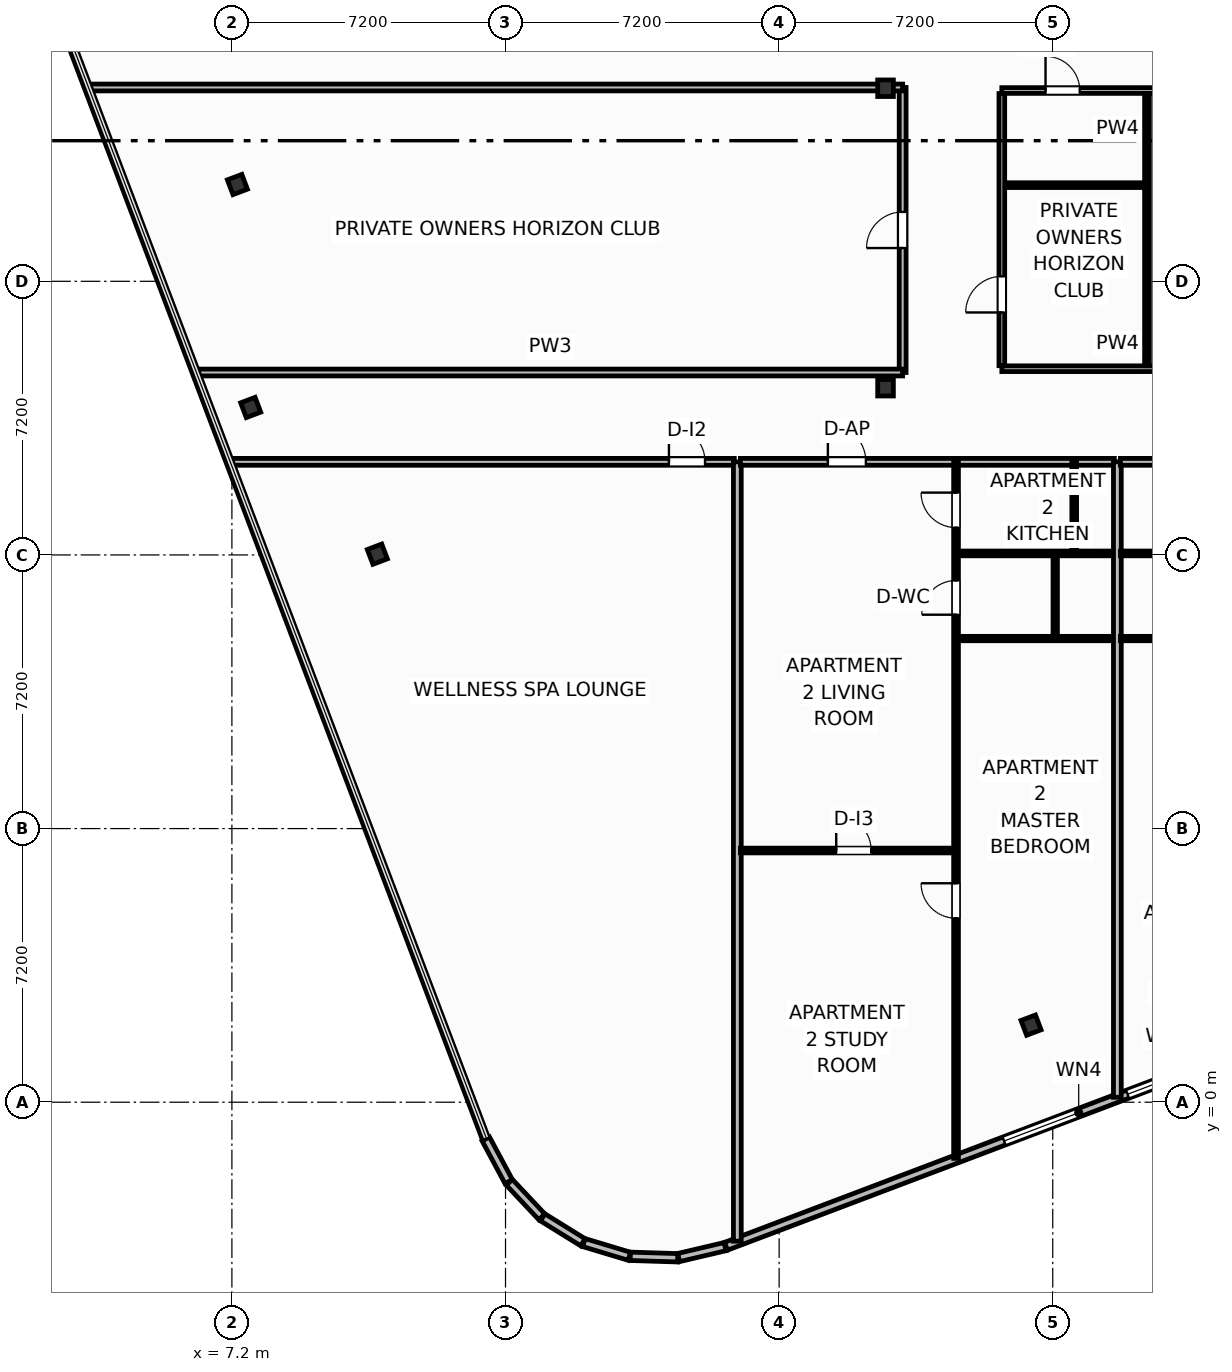
"""IFC4 building model, lengths in metres.
Left out: names, types, materials, properties, quantities, classifications, styles, units other than length and angle.
Written with IfcOpenShell. Run it as: python <this file> out.ifc"""

import sys

from ifc_helpers import new_model, si_unit, direction, frame, frame_2d, origin, origin_2d, place, context, subcontext, project, spatial, rectangle, i_section, extrude, element, fill, save


model = new_model("IFC4")
c1 = context("Model", 3, precision=1e-05, world=origin(), true_north=direction((0.0, 1.0)))
c2 = subcontext(c1, "Body", "Model", "MODEL_VIEW")
j1 = project(units=[si_unit("LENGTHUNIT", "METRE"), si_unit("PLANEANGLEUNIT", "RADIAN")], contexts=[c1])
p1 = place(None, origin())
s1 = spatial("IfcSite", under=j1, at=p1, CompositionType="ELEMENT")
p2 = place(p1, origin())
s2 = spatial("IfcBuilding", under=s1, at=p2, CompositionType="ELEMENT")
p3 = place(p2, frame((0.0, 0.0, 216.4)))
s3 = spatial("IfcBuildingStorey", under=s2, at=p3, CompositionType="ELEMENT", Elevation=216.4)
for number, where, z_axis, x_axis in (
    (1, (24.4, 18.8, 0.0), (0.0, 0.0, 1.0), (1.0, 0.0, 0.0)),
    (2, (24.4, 26.68, 0.0), (0.0, 0.0, 1.0), (1.0, 0.0, 0.0)),
):
    element("IfcColumn", number, at=place(p3, frame(where, z_axis=z_axis, x_axis=x_axis)), inside=s3, PredefinedType="COLUMN", context=c2, shape_type="SweptSolid", body=[
        extrude(i_section(OverallWidth=0.412, OverallDepth=0.435, WebThickness=0.036, FlangeThickness=0.057, FilletRadius=0.025, at=origin_2d()), origin(), (0.0, 0.0, 1.0), 3.7),
    ])
for number, where, z_axis, x_axis in (
    (3, (28.229, 2.028, 0.0), (0.0, 0.0, 1.0), (0.935, 0.354, 0.0)),
    (4, (7.345, 24.146, 0.0), (0.0, 0.0, 1.0), (0.935, 0.354, 0.0)),
    (5, (7.695, 18.281, 0.0), (0.0, 0.0, 1.0), (0.935, 0.354, 0.0)),
    (6, (11.027, 14.42, 0.0), (0.0, 0.0, 1.0), (0.935, 0.354, 0.0)),
):
    element("IfcColumn", number, at=place(p3, frame(where, z_axis=z_axis, x_axis=x_axis)), inside=s3, PredefinedType="COLUMN", context=c2, shape_type="SweptSolid", body=[
        extrude(i_section(OverallWidth=0.406, OverallDepth=0.416, WebThickness=0.03, FlangeThickness=0.048, FilletRadius=0.025, at=origin_2d()), origin(), (0.0, 0.0, 1.0), 3.7),
    ])
p4 = place(p3, frame((13.881, -0.966, 0.0), z_axis=(0.0, 0.0, 1.0), x_axis=(0.473242342135, -0.88093228208, 0.0)))
e7 = element("IfcWall", 7, at=p4, inside=s3, PredefinedType="SOLIDWALL", context=c2, shape_type="SweptSolid", body=[
    extrude(rectangle(XDim=1.274, YDim=0.22, at=frame_2d((0.637, 0.0))), origin(), (0.0, 0.0, 1.0), 2.73),
])
for number, where, z_axis, x_axis in (
    (8, (14.5, -2.106, 0.0), (0.0, 0.0, 1.0), (0.685, -0.729, 0.0)),
    (9, (15.377, -3.029, 0.0), (0.0, 0.0, 1.0), (0.85, -0.526, 0.0)),
    (10, (16.463, -3.694, 0.0), (0.0, 0.0, 1.0), (0.958, -0.288, 0.0)),
):
    element("IfcWall", number, at=place(p3, frame(where, z_axis=z_axis, x_axis=x_axis)), inside=s3, PredefinedType="SOLIDWALL", context=c2, shape_type="SweptSolid", body=[
        extrude(rectangle(XDim=1.249, YDim=0.22, at=frame_2d((0.624, 0.0))), origin(), (0.0, 0.0, 1.0), 2.73),
    ])
p5 = place(p3, frame((17.683, -4.055, 0.0), z_axis=(0.0, 0.0, 1.0), x_axis=(0.999522886512, -0.030886879732, 0.0)))
e11 = element("IfcWall", 11, at=p5, inside=s3, PredefinedType="SOLIDWALL", context=c2, shape_type="SweptSolid", body=[
    extrude(rectangle(XDim=1.249, YDim=0.22, at=frame_2d((0.625, 0.0))), origin(), (0.0, 0.0, 1.0), 2.73),
])
p6 = place(p3, frame((18.956, -4.087, 0.0), z_axis=(0.0, 0.0, 1.0), x_axis=(0.973463008152, 0.228844426981, 0.0)))
e12 = element("IfcWall", 12, at=p6, inside=s3, PredefinedType="SOLIDWALL", context=c2, shape_type="SweptSolid", body=[
    extrude(rectangle(XDim=1.257, YDim=0.22, at=frame_2d((0.628, 0.0))), origin(), (0.0, 0.0, 1.0), 2.73),
])
p7 = place(p3, frame((20.202, -3.791, 0.0), z_axis=(0.0, 0.0, 1.0), x_axis=(0.935225574232, 0.354052432984, 0.0)))
e13 = element("IfcWall", 13, at=p7, inside=s3, PredefinedType="SOLIDWALL", context=c2, shape_type="SweptSolid", body=[
    extrude(rectangle(XDim=17.747, YDim=0.22, at=frame_2d((8.874, 0.0))), origin(), (0.0, 0.0, 1.0), 2.73),
])
p8 = place(p7, frame((7.823, 0.0, 0.8)))
e14 = element("IfcOpeningElement", 14, at=p8, cuts=e13, PredefinedType="OPENING", context=c2, shape_type="SweptSolid", body=[
    extrude(rectangle(XDim=2.1, YDim=1.75, at=frame_2d((1.05, 0.875))), frame((0.0, 0.12, 0.0), z_axis=(0.0, -1.0, 0.0), x_axis=(1.0, 0.0, 0.0)), (0.0, 0.0, 1.0), 0.24),
])
p9 = place(p7, frame((11.298, 0.0, 0.8)))
e15 = element("IfcOpeningElement", 15, at=p9, cuts=e13, PredefinedType="OPENING", context=c2, shape_type="SweptSolid", body=[
    extrude(rectangle(XDim=1.15, YDim=1.4, at=frame_2d((0.575, 0.7))), frame((0.0, 0.12, 0.0), z_axis=(0.0, -1.0, 0.0), x_axis=(1.0, 0.0, 0.0)), (0.0, 0.0, 1.0), 0.24),
])
p10 = place(p3, frame((7.196, 16.85, 0.0), z_axis=(0.0, 0.0, 1.0), x_axis=(1.0, 0.0, 0.0)))
e16 = element("IfcWall", 16, at=p10, inside=s3, PredefinedType="PARTITIONING", context=c2, shape_type="SweptSolid", body=[
    extrude(rectangle(XDim=13.224, YDim=0.18, at=frame_2d((6.612, 0.0))), origin(), (0.0, 0.0, 1.0), 3.45),
])
p11 = place(p10, frame((11.504, 0.0, 0.0)))
e17 = element("IfcOpeningElement", 17, at=p11, cuts=e16, PredefinedType="OPENING", context=c2, shape_type="SweptSolid", body=[
    extrude(rectangle(XDim=0.95, YDim=2.05, at=frame_2d((0.475, 1.025))), frame((0.0, 0.1, 0.0), z_axis=(0.0, -1.0, 0.0), x_axis=(1.0, 0.0, 0.0)), (0.0, 0.0, 1.0), 0.2),
])
p12 = place(p3, frame((20.5, -3.657, 0.0), z_axis=(0.0, 0.0, 1.0), x_axis=(0.0, 1.0, 0.0)))
e18 = element("IfcWall", 18, at=p12, inside=s3, PredefinedType="PARTITIONING", context=c2, shape_type="SweptSolid", body=[
    extrude(rectangle(XDim=20.507, YDim=0.205, at=frame_2d((10.253, 0.0))), origin(), (0.0, 0.0, 1.0), 3.45),
])
p13 = place(p3, frame((20.58, 6.623, 0.0), z_axis=(0.0, 0.0, 1.0), x_axis=(1.0, 0.0, 0.0)))
e19 = element("IfcWall", 19, at=p13, inside=s3, PredefinedType="PARTITIONING", context=c2, shape_type="SweptSolid", body=[
    extrude(rectangle(XDim=5.605, YDim=0.125, at=frame_2d((2.803, 0.0))), origin(), (0.0, 0.0, 1.0), 3.45),
])
p14 = place(p13, frame((2.522, 0.0, 0.0)))
e20 = element("IfcOpeningElement", 20, at=p14, cuts=e19, PredefinedType="OPENING", context=c2, shape_type="SweptSolid", body=[
    extrude(rectangle(XDim=0.92, YDim=2.05, at=frame_2d((0.46, 1.025))), frame((0.0, 0.073, 0.0), z_axis=(0.0, -1.0, 0.0), x_axis=(1.0, 0.0, 0.0)), (0.0, 0.0, 1.0), 0.145),
])
p15 = place(p3, frame((20.58, 16.85, 0.0), z_axis=(0.0, 0.0, 1.0), x_axis=(1.0, 0.0, 0.0)))
e21 = element("IfcWall", 21, at=p15, inside=s3, PredefinedType="PARTITIONING", context=c2, shape_type="SweptSolid", body=[
    extrude(rectangle(XDim=9.84, YDim=0.18, at=frame_2d((4.92, 0.0))), origin(), (0.0, 0.0, 1.0), 3.45),
])
p16 = place(p15, frame((2.302, 0.0, 0.0)))
e22 = element("IfcOpeningElement", 22, at=p16, cuts=e21, PredefinedType="OPENING", context=c2, shape_type="SweptSolid", body=[
    extrude(rectangle(XDim=1.0, YDim=2.2, at=frame_2d((0.5, 1.1))), frame((0.0, 0.1, 0.0), z_axis=(0.0, -1.0, 0.0), x_axis=(1.0, 0.0, 0.0)), (0.0, 0.0, 1.0), 0.2),
])
p17 = place(p3, frame((26.255, -1.478, 0.0), z_axis=(0.0, 0.0, 1.0), x_axis=(0.0, 1.0, 0.0)))
e23 = element("IfcWall", 23, at=p17, inside=s3, PredefinedType="PARTITIONING", context=c2, shape_type="SweptSolid", body=[
    extrude(rectangle(XDim=18.328, YDim=0.125, at=frame_2d((9.164, 0.0))), origin(), (0.0, 0.0, 1.0), 2.739),
])
p18 = place(p17, frame((6.319, 0.0, 0.0)))
e24 = element("IfcOpeningElement", 24, at=p18, cuts=e23, PredefinedType="OPENING", context=c2, shape_type="SweptSolid", body=[
    extrude(rectangle(XDim=0.92, YDim=2.05, at=frame_2d((0.46, 1.025))), frame((0.0, 0.073, 0.0), z_axis=(0.0, -1.0, 0.0), x_axis=(1.0, 0.0, 0.0)), (0.0, 0.0, 1.0), 0.145),
])
p19 = place(p17, frame((14.305, 0.0, 0.0)))
e25 = element("IfcOpeningElement", 25, at=p19, cuts=e23, PredefinedType="OPENING", context=c2, shape_type="SweptSolid", body=[
    extrude(rectangle(XDim=0.9, YDim=2.05, at=frame_2d((0.45, 1.025))), frame((0.0, 0.073, 0.0), z_axis=(0.0, -1.0, 0.0), x_axis=(1.0, 0.0, 0.0)), (0.0, 0.0, 1.0), 0.145),
])
p20 = place(p17, frame((16.598, 0.0, 0.0)))
e26 = element("IfcOpeningElement", 26, at=p20, cuts=e23, PredefinedType="OPENING", context=c2, shape_type="SweptSolid", body=[
    extrude(rectangle(XDim=0.92, YDim=2.05, at=frame_2d((0.46, 1.025))), frame((0.0, 0.073, 0.0), z_axis=(0.0, -1.0, 0.0), x_axis=(1.0, 0.0, 0.0)), (0.0, 0.0, 1.0), 0.145),
])
p21 = place(p3, frame((26.325, 14.44, 0.0), z_axis=(0.0, 0.0, 1.0), x_axis=(1.0, 0.0, 0.0)))
e27 = element("IfcWall", 27, at=p21, inside=s3, PredefinedType="PARTITIONING", context=c2, shape_type="SweptSolid", body=[
    extrude(rectangle(XDim=4.095, YDim=0.125, at=frame_2d((2.047, 0.0))), origin(), (0.0, 0.0, 1.0), 3.45),
])
p22 = place(p3, frame((26.325, 12.2, 0.0), z_axis=(0.0, 0.0, 1.0), x_axis=(1.0, 0.0, 0.0)))
e28 = element("IfcWall", 28, at=p22, inside=s3, PredefinedType="PARTITIONING", context=c2, shape_type="SweptSolid", body=[
    extrude(rectangle(XDim=4.095, YDim=0.115, at=frame_2d((2.047, 0.0))), origin(), (0.0, 0.0, 1.0), 3.45),
])
p23 = place(p3, frame((29.365, 14.44, 0.0), z_axis=(0.0, 0.0, 1.0), x_axis=(0.0, 1.0, 0.0)))
e29 = element("IfcWall", 29, at=p23, inside=s3, PredefinedType="PARTITIONING", context=c2, shape_type="SweptSolid", body=[
    extrude(rectangle(XDim=2.41, YDim=0.125, at=frame_2d((1.205, 0.0))), origin(), (0.0, 0.0, 1.0), 3.45),
])
p24 = place(p3, frame((28.865, 12.2, 0.0), z_axis=(0.0, 0.0, 1.0), x_axis=(0.0, 1.0, 0.0)))
e30 = element("IfcWall", 30, at=p24, inside=s3, PredefinedType="PARTITIONING", context=c2, shape_type="SweptSolid", body=[
    extrude(rectangle(XDim=2.24, YDim=0.115, at=frame_2d((1.12, 0.0))), origin(), (0.0, 0.0, 1.0), 3.45),
])
p25 = place(p3, frame((30.5, 0.129, 0.0), z_axis=(0.0, 0.0, 1.0), x_axis=(0.0, 1.0, 0.0)))
e31 = element("IfcWall", 31, at=p25, inside=s3, PredefinedType="PARTITIONING", context=c2, shape_type="SweptSolid", body=[
    extrude(rectangle(XDim=16.721, YDim=0.205, at=frame_2d((8.36, 0.0))), origin(), (0.0, 0.0, 1.0), 3.45),
])
p26 = place(p3, frame((30.58, 16.85, 0.0), z_axis=(0.0, 0.0, 1.0), x_axis=(1.0, 0.0, 0.0)))
e32 = element("IfcWall", 32, at=p26, inside=s3, PredefinedType="PARTITIONING", context=c2, shape_type="SweptSolid", body=[
    extrude(rectangle(XDim=9.84, YDim=0.18, at=frame_2d((4.92, 0.0))), origin(), (0.0, 0.0, 1.0), 3.45),
])
p27 = place(p26, frame((6.537, 0.0, 0.0)))
e33 = element("IfcOpeningElement", 33, at=p27, cuts=e32, PredefinedType="OPENING", context=c2, shape_type="SweptSolid", body=[
    extrude(rectangle(XDim=1.0, YDim=2.2, at=frame_2d((0.5, 1.1))), frame((0.0, 0.1, 0.0), z_axis=(0.0, -1.0, 0.0), x_axis=(1.0, 0.0, 0.0)), (0.0, 0.0, 1.0), 0.2),
])
p28 = place(p3, frame((30.58, 14.44, 0.0), z_axis=(0.0, 0.0, 1.0), x_axis=(1.0, 0.0, 0.0)))
e34 = element("IfcWall", 34, at=p28, inside=s3, PredefinedType="PARTITIONING", context=c2, shape_type="SweptSolid", body=[
    extrude(rectangle(XDim=4.095, YDim=0.125, at=frame_2d((2.047, 0.0))), origin(), (0.0, 0.0, 1.0), 3.45),
])
p29 = place(p3, frame((30.58, 12.2, 0.0), z_axis=(0.0, 0.0, 1.0), x_axis=(1.0, 0.0, 0.0)))
e35 = element("IfcWall", 35, at=p29, inside=s3, PredefinedType="PARTITIONING", context=c2, shape_type="SweptSolid", body=[
    extrude(rectangle(XDim=4.095, YDim=0.115, at=frame_2d((2.047, 0.0))), origin(), (0.0, 0.0, 1.0), 3.45),
])
p30 = place(p3, frame((24.85, 19.2, 0.0), z_axis=(0.0, 0.0, 1.0), x_axis=(0.0, 1.0, 0.0)))
e36 = element("IfcWall", 36, at=p30, inside=s3, PredefinedType="PARTITIONING", context=c2, shape_type="SweptSolid", body=[
    extrude(rectangle(XDim=7.5, YDim=0.18, at=frame_2d((3.75, 0.0))), origin(), (0.0, 0.0, 1.0), 3.45),
])
p31 = place(p30, frame((3.275, 0.0, 0.0)))
e37 = element("IfcOpeningElement", 37, at=p31, cuts=e36, PredefinedType="OPENING", context=c2, shape_type="SweptSolid", body=[
    extrude(rectangle(XDim=0.95, YDim=2.05, at=frame_2d((0.475, 1.025))), frame((0.0, 0.1, 0.0), z_axis=(0.0, -1.0, 0.0), x_axis=(1.0, 0.0, 0.0)), (0.0, 0.0, 1.0), 0.2),
])
p32 = place(p3, frame((6.306, 19.2, 0.0), z_axis=(0.0, 0.0, 1.0), x_axis=(1.0, 0.0, 0.0)))
e38 = element("IfcWall", 38, at=p32, inside=s3, PredefinedType="PARTITIONING", context=c2, shape_type="SweptSolid", body=[
    extrude(rectangle(XDim=18.544, YDim=0.18, at=frame_2d((9.272, 0.0))), origin(), (0.0, 0.0, 1.0), 3.45),
])
p33 = place(p3, frame((3.467, 26.7, 0.0), z_axis=(0.0, 0.0, 1.0), x_axis=(1.0, 0.0, 0.0)))
e39 = element("IfcWall", 39, at=p33, inside=s3, PredefinedType="PARTITIONING", context=c2, shape_type="SweptSolid", body=[
    extrude(rectangle(XDim=21.383, YDim=0.18, at=frame_2d((10.691, 0.0))), origin(), (0.0, 0.0, 1.0), 2.662),
])
p34 = place(p3, frame((27.46, 19.3, 0.0), z_axis=(0.0, 0.0, 1.0), x_axis=(1.0, 0.0, 0.0)))
e40 = element("IfcWall", 40, at=p34, inside=s3, PredefinedType="PARTITIONING", context=c2, shape_type="SweptSolid", body=[
    extrude(rectangle(XDim=6.1, YDim=0.15, at=frame_2d((3.05, 0.0))), origin(), (0.0, 0.0, 1.0), 2.662),
])
p35 = place(p3, frame((27.46, 26.62, 0.0), z_axis=(0.0, 0.0, 1.0), x_axis=(1.0, 0.0, 0.0)))
e41 = element("IfcWall", 41, at=p35, inside=s3, PredefinedType="PARTITIONING", context=c2, shape_type="SweptSolid", body=[
    extrude(rectangle(XDim=6.1, YDim=0.15, at=frame_2d((3.05, 0.0))), origin(), (0.0, 0.0, 1.0), 2.662),
])
p36 = place(p35, frame((1.15, 0.0, 0.0)))
e42 = element("IfcOpeningElement", 42, at=p36, cuts=e41, PredefinedType="OPENING", context=c2, shape_type="SweptSolid", body=[
    extrude(rectangle(XDim=0.9, YDim=2.05, at=frame_2d((0.45, 1.025))), frame((0.0, 0.085, 0.0), z_axis=(0.0, -1.0, 0.0), x_axis=(1.0, 0.0, 0.0)), (0.0, 0.0, 1.0), 0.17),
])
p37 = place(p35, frame((4.45, 0.0, 0.0)))
e43 = element("IfcOpeningElement", 43, at=p37, cuts=e41, PredefinedType="OPENING", context=c2, shape_type="SweptSolid", body=[
    extrude(rectangle(XDim=0.92, YDim=2.05, at=frame_2d((0.46, 1.025))), frame((0.0, 0.085, 0.0), z_axis=(0.0, -1.0, 0.0), x_axis=(1.0, 0.0, 0.0)), (0.0, 0.0, 1.0), 0.17),
])
p38 = place(p3, frame((31.28, 19.38, 0.0), z_axis=(0.0, 0.0, 1.0), x_axis=(0.0, 1.0, 0.0)))
e44 = element("IfcWall", 44, at=p38, inside=s3, PredefinedType="PARTITIONING", context=c2, shape_type="SweptSolid", body=[
    extrude(rectangle(XDim=7.16, YDim=0.125, at=frame_2d((3.58, 0.0))), origin(), (0.0, 0.0, 1.0), 3.45),
])
p39 = place(p3, frame((27.52, 24.13, 0.0), z_axis=(0.0, 0.0, 1.0), x_axis=(1.0, 0.0, 0.0)))
e45 = element("IfcWall", 45, at=p39, inside=s3, PredefinedType="PARTITIONING", context=c2, shape_type="SweptSolid", body=[
    extrude(rectangle(XDim=3.7, YDim=0.125, at=frame_2d((1.85, 0.0))), origin(), (0.0, 0.0, 1.0), 3.45),
])
p40 = place(p3, frame((27.46, 19.38, 0.0), z_axis=(0.0, 0.0, 1.0), x_axis=(0.0, 1.0, 0.0)))
e46 = element("IfcWall", 46, at=p40, inside=s3, PredefinedType="PARTITIONING", context=c2, shape_type="SweptSolid", body=[
    extrude(rectangle(XDim=7.16, YDim=0.15, at=frame_2d((3.58, 0.0))), origin(), (0.0, 0.0, 1.0), 3.45),
])
p41 = place(p40, frame((1.4, 0.0, 0.0)))
e47 = element("IfcOpeningElement", 47, at=p41, cuts=e46, PredefinedType="OPENING", context=c2, shape_type="SweptSolid", body=[
    extrude(rectangle(XDim=0.95, YDim=2.05, at=frame_2d((0.475, 1.025))), frame((0.0, 0.085, 0.0), z_axis=(0.0, -1.0, 0.0), x_axis=(1.0, 0.0, 0.0)), (0.0, 0.0, 1.0), 0.17),
])
p42 = place(p8, origin())
e48 = element("IfcWindow", 48, at=p42, inside=s3, PartitioningType="SINGLE_PANEL", PredefinedType="WINDOW", context=c2, shape_type="SweptSolid", body=[
    extrude(rectangle(XDim=2.1, YDim=1.75, at=frame_2d((1.05, 0.875))), frame((0.0, 0.03, 0.0), z_axis=(0.0, -1.0, 0.0), x_axis=(1.0, 0.0, 0.0)), (0.0, 0.0, 1.0), 0.06),
])
fill(e14, e48)
p43 = place(p11, origin())
e49 = element("IfcDoor", 49, at=p43, inside=s3, OperationType="SINGLE_SWING_LEFT", PredefinedType="DOOR", context=c2, shape_type="SweptSolid", body=[
    extrude(rectangle(XDim=0.95, YDim=2.05, at=frame_2d((0.475, 1.025))), frame((0.0, 0.025, 0.0), z_axis=(0.0, -1.0, 0.0), x_axis=(1.0, 0.0, 0.0)), (0.0, 0.0, 1.0), 0.05),
])
fill(e17, e49)
p44 = place(p14, origin())
e50 = element("IfcDoor", 50, at=p44, inside=s3, OperationType="SINGLE_SWING_LEFT", PredefinedType="DOOR", context=c2, shape_type="SweptSolid", body=[
    extrude(rectangle(XDim=0.92, YDim=2.05, at=frame_2d((0.46, 1.025))), frame((0.0, 0.025, 0.0), z_axis=(0.0, -1.0, 0.0), x_axis=(1.0, 0.0, 0.0)), (0.0, 0.0, 1.0), 0.05),
])
fill(e20, e50)
p45 = place(p16, origin())
e51 = element("IfcDoor", 51, at=p45, inside=s3, OperationType="SINGLE_SWING_LEFT", PredefinedType="DOOR", context=c2, shape_type="SweptSolid", body=[
    extrude(rectangle(XDim=1.0, YDim=2.2, at=frame_2d((0.5, 1.1))), frame((0.0, 0.025, 0.0), z_axis=(0.0, -1.0, 0.0), x_axis=(1.0, 0.0, 0.0)), (0.0, 0.0, 1.0), 0.05),
])
fill(e22, e51)
p46 = place(p18, origin())
e52 = element("IfcDoor", 52, at=p46, inside=s3, OperationType="SINGLE_SWING_RIGHT", PredefinedType="DOOR", context=c2, shape_type="SweptSolid", body=[
    extrude(rectangle(XDim=0.92, YDim=2.05, at=frame_2d((0.46, 1.025))), frame((0.0, 0.025, 0.0), z_axis=(0.0, -1.0, 0.0), x_axis=(1.0, 0.0, 0.0)), (0.0, 0.0, 1.0), 0.05),
])
fill(e24, e52)
p47 = place(p19, origin())
e53 = element("IfcDoor", 53, at=p47, inside=s3, OperationType="SINGLE_SWING_LEFT", PredefinedType="DOOR", context=c2, shape_type="SweptSolid", body=[
    extrude(rectangle(XDim=0.9, YDim=2.05, at=frame_2d((0.45, 1.025))), frame((0.0, 0.025, 0.0), z_axis=(0.0, -1.0, 0.0), x_axis=(1.0, 0.0, 0.0)), (0.0, 0.0, 1.0), 0.05),
])
fill(e25, e53)
p48 = place(p20, origin())
e54 = element("IfcDoor", 54, at=p48, inside=s3, OperationType="SINGLE_SWING_RIGHT", PredefinedType="DOOR", context=c2, shape_type="SweptSolid", body=[
    extrude(rectangle(XDim=0.92, YDim=2.05, at=frame_2d((0.46, 1.025))), frame((0.0, 0.025, 0.0), z_axis=(0.0, -1.0, 0.0), x_axis=(1.0, 0.0, 0.0)), (0.0, 0.0, 1.0), 0.05),
])
fill(e26, e54)
p49 = place(p31, origin())
e55 = element("IfcDoor", 55, at=p49, inside=s3, OperationType="SINGLE_SWING_LEFT", PredefinedType="DOOR", context=c2, shape_type="SweptSolid", body=[
    extrude(rectangle(XDim=0.95, YDim=2.05, at=frame_2d((0.475, 1.025))), frame((0.0, 0.025, 0.0), z_axis=(0.0, -1.0, 0.0), x_axis=(1.0, 0.0, 0.0)), (0.0, 0.0, 1.0), 0.05),
])
fill(e37, e55)
p50 = place(p36, origin())
e56 = element("IfcDoor", 56, at=p50, inside=s3, OperationType="SINGLE_SWING_LEFT", PredefinedType="DOOR", context=c2, shape_type="SweptSolid", body=[
    extrude(rectangle(XDim=0.9, YDim=2.05, at=frame_2d((0.45, 1.025))), frame((0.0, 0.025, 0.0), z_axis=(0.0, -1.0, 0.0), x_axis=(1.0, 0.0, 0.0)), (0.0, 0.0, 1.0), 0.05),
])
fill(e42, e56)
p51 = place(p41, origin())
e57 = element("IfcDoor", 57, at=p51, inside=s3, OperationType="SINGLE_SWING_LEFT", PredefinedType="DOOR", context=c2, shape_type="SweptSolid", body=[
    extrude(rectangle(XDim=0.95, YDim=2.05, at=frame_2d((0.475, 1.025))), frame((0.0, 0.025, 0.0), z_axis=(0.0, -1.0, 0.0), x_axis=(1.0, 0.0, 0.0)), (0.0, 0.0, 1.0), 0.05),
])
fill(e47, e57)
p52 = place(p9, origin())
e58 = element("IfcWindow", 58, at=p52, inside=s3, PartitioningType="SINGLE_PANEL", PredefinedType="WINDOW", context=c2, shape_type="SweptSolid", body=[
    extrude(rectangle(XDim=1.15, YDim=1.4, at=frame_2d((0.575, 0.7))), frame((0.0, 0.03, 0.0), z_axis=(0.0, -1.0, 0.0), x_axis=(1.0, 0.0, 0.0)), (0.0, 0.0, 1.0), 0.06),
])
fill(e15, e58)
save(model, sys.argv[1])
